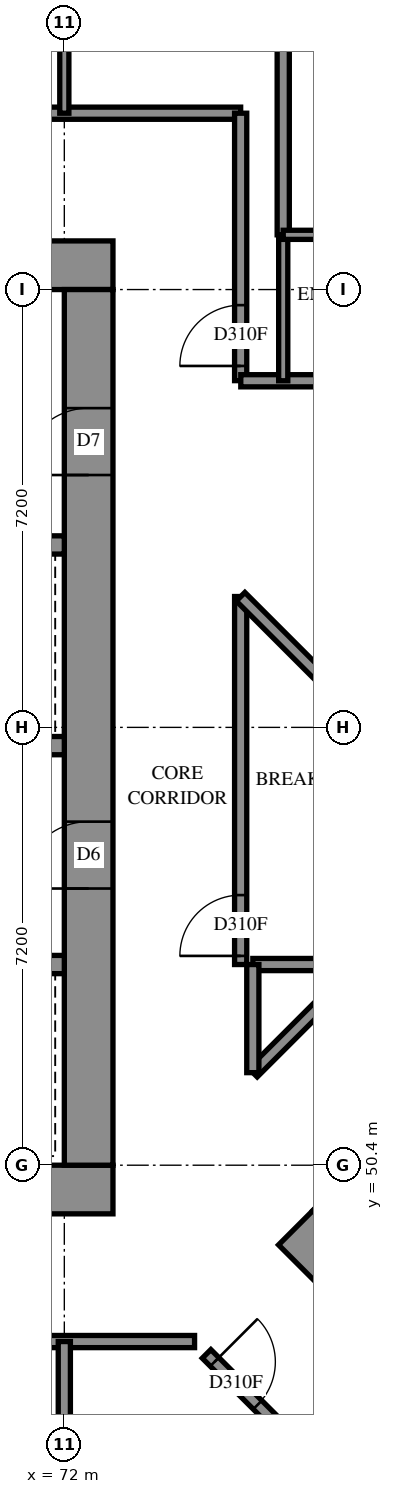
"""IFC4 building model, lengths in metres.
Left out: names, types, materials, properties, quantities, classifications, styles, units other than length and angle.
Written with IfcOpenShell. Run it as: python <this file> out.ifc"""

import sys

from ifc_helpers import new_model, si_unit, direction, frame, frame_2d, origin, place, context, subcontext, project, spatial, rectangle, extrude, element, fill, save


model = new_model("IFC4")
c1 = context("Model", 3, precision=1e-05, world=origin(), true_north=direction((0.0, 1.0)))
c2 = subcontext(c1, "Body", "Model", "MODEL_VIEW")
j1 = project(units=[si_unit("LENGTHUNIT", "METRE"), si_unit("PLANEANGLEUNIT", "RADIAN")], contexts=[c1])
p1 = place(None, origin())
s1 = spatial("IfcSite", under=j1, at=p1, CompositionType="ELEMENT")
p2 = place(p1, origin())
s2 = spatial("IfcBuilding", under=s1, at=p2, CompositionType="ELEMENT")
p3 = place(p2, frame((0.0, 0.0, 91.4)))
s3 = spatial("IfcBuildingStorey", under=s2, at=p3, CompositionType="ELEMENT", Elevation=91.4)
p4 = place(p3, frame((56.8, 50.0, -0.3), z_axis=(0.0, 0.0, 1.0), x_axis=(1.0, 0.0, 0.0)))
e1 = element("IfcWall", 1, at=p4, inside=s3, PredefinedType="SHEAR", context=c2, shape_type="SweptSolid", body=[
    extrude(rectangle(XDim=16.0, YDim=0.8, at=frame_2d((8.0, 0.0))), origin(), (0.0, 0.0, 1.0), 2.7),
])
p5 = place(p3, frame((56.8, 65.2, -0.3), z_axis=(0.0, 0.0, 1.0), x_axis=(1.0, 0.0, 0.0)))
e2 = element("IfcWall", 2, at=p5, inside=s3, PredefinedType="SHEAR", context=c2, shape_type="SweptSolid", body=[
    extrude(rectangle(XDim=16.0, YDim=0.8, at=frame_2d((8.0, 0.0))), origin(), (0.0, 0.0, 1.0), 2.7),
])
p6 = place(p5, frame((10.8, 0.0, 0.3)))
e3 = element("IfcOpeningElement", 3, at=p6, cuts=e2, PredefinedType="OPENING", context=c2, shape_type="SweptSolid", body=[
    extrude(rectangle(XDim=0.8, YDim=2.1, at=frame_2d((0.4, 1.05))), frame((0.0, 0.41, 0.0), z_axis=(0.0, -1.0, 0.0), x_axis=(1.0, 0.0, 0.0)), (0.0, 0.0, 1.0), 0.82),
])
p7 = place(p3, frame((72.4, 50.4, -0.3), z_axis=(0.0, 0.0, 1.0), x_axis=(0.0, 1.0, 0.0)))
e4 = element("IfcWall", 4, at=p7, inside=s3, PredefinedType="SHEAR", context=c2, shape_type="SweptSolid", body=[
    extrude(rectangle(XDim=14.4, YDim=0.8, at=frame_2d((7.2, 0.0))), origin(), (0.0, 0.0, 1.0), 2.7),
])
p8 = place(p7, frame((4.55, 0.0, 0.3)))
e5 = element("IfcOpeningElement", 5, at=p8, cuts=e4, PredefinedType="OPENING", context=c2, shape_type="SweptSolid", body=[
    extrude(rectangle(XDim=1.1, YDim=2.1, at=frame_2d((0.55, 1.05))), frame((0.0, 0.41, 0.0), z_axis=(0.0, -1.0, 0.0), x_axis=(1.0, 0.0, 0.0)), (0.0, 0.0, 1.0), 0.82),
])
p9 = place(p7, frame((11.35, 0.0, 0.3)))
e6 = element("IfcOpeningElement", 6, at=p9, cuts=e4, PredefinedType="OPENING", context=c2, shape_type="SweptSolid", body=[
    extrude(rectangle(XDim=1.1, YDim=2.1, at=frame_2d((0.55, 1.05))), frame((0.0, 0.41, 0.0), z_axis=(0.0, -1.0, 0.0), x_axis=(1.0, 0.0, 0.0)), (0.0, 0.0, 1.0), 0.82),
])
p10 = place(p3, frame((57.6, 53.7, 0.0), z_axis=(0.0, 0.0, 1.0), x_axis=(1.0, 0.0, 0.0)))
e7 = element("IfcWall", 7, at=p10, inside=s3, PredefinedType="SOLIDWALL", context=c2, shape_type="SweptSolid", body=[
    extrude(rectangle(XDim=14.4, YDim=0.3, at=frame_2d((7.2, 0.0))), origin(), (0.0, 0.0, 1.0), 3.1),
])
p11 = place(p10, frame((1.25, 0.0, 0.0)))
e8 = element("IfcOpeningElement", 8, at=p11, cuts=e7, PredefinedType="OPENING", context=c2, shape_type="SweptSolid", body=[
    extrude(rectangle(XDim=1.1, YDim=2.1, at=frame_2d((0.55, 1.05))), frame((0.0, 0.16, 0.0), z_axis=(0.0, -1.0, 0.0), x_axis=(1.0, 0.0, 0.0)), (0.0, 0.0, 1.0), 0.32),
])
p12 = place(p10, frame((4.85, 0.0, 0.0)))
e9 = element("IfcOpeningElement", 9, at=p12, cuts=e7, PredefinedType="OPENING", context=c2, shape_type="SweptSolid", body=[
    extrude(rectangle(XDim=1.1, YDim=2.1, at=frame_2d((0.55, 1.05))), frame((0.0, 0.16, 0.0), z_axis=(0.0, -1.0, 0.0), x_axis=(1.0, 0.0, 0.0)), (0.0, 0.0, 1.0), 0.32),
])
p13 = place(p10, frame((8.45, 0.0, 0.0)))
e10 = element("IfcOpeningElement", 10, at=p13, cuts=e7, PredefinedType="OPENING", context=c2, shape_type="SweptSolid", body=[
    extrude(rectangle(XDim=1.1, YDim=2.1, at=frame_2d((0.55, 1.05))), frame((0.0, 0.16, 0.0), z_axis=(0.0, -1.0, 0.0), x_axis=(1.0, 0.0, 0.0)), (0.0, 0.0, 1.0), 0.32),
])
p14 = place(p10, frame((12.05, 0.0, 0.0)))
e11 = element("IfcOpeningElement", 11, at=p14, cuts=e7, PredefinedType="OPENING", context=c2, shape_type="SweptSolid", body=[
    extrude(rectangle(XDim=1.1, YDim=2.1, at=frame_2d((0.55, 1.05))), frame((0.0, 0.16, 0.0), z_axis=(0.0, -1.0, 0.0), x_axis=(1.0, 0.0, 0.0)), (0.0, 0.0, 1.0), 0.32),
])
p15 = place(p3, frame((57.6, 57.3, 0.0), z_axis=(0.0, 0.0, 1.0), x_axis=(1.0, 0.0, 0.0)))
e12 = element("IfcWall", 12, at=p15, inside=s3, PredefinedType="SOLIDWALL", context=c2, shape_type="SweptSolid", body=[
    extrude(rectangle(XDim=14.4, YDim=0.3, at=frame_2d((7.2, 0.0))), origin(), (0.0, 0.0, 1.0), 3.1),
])
p16 = place(p15, frame((12.05, 0.0, 0.0)))
e13 = element("IfcOpeningElement", 13, at=p16, cuts=e12, PredefinedType="OPENING", context=c2, shape_type="SweptSolid", body=[
    extrude(rectangle(XDim=1.1, YDim=2.1, at=frame_2d((0.55, 1.05))), frame((0.0, 0.16, 0.0), z_axis=(0.0, -1.0, 0.0), x_axis=(1.0, 0.0, 0.0)), (0.0, 0.0, 1.0), 0.32),
])
p17 = place(p3, frame((64.8, 60.6, 0.0), z_axis=(0.0, 0.0, 1.0), x_axis=(1.0, 0.0, 0.0)))
e14 = element("IfcWall", 14, at=p17, inside=s3, PredefinedType="SOLIDWALL", context=c2, shape_type="SweptSolid", body=[
    extrude(rectangle(XDim=7.2, YDim=0.3, at=frame_2d((3.6, 0.0))), origin(), (0.0, 0.0, 1.0), 3.1),
])
p18 = place(p3, frame((75.806, 49.373, -0.3), z_axis=(0.0, 0.0, 1.0), x_axis=(0.7071067812, -0.7071067812, 0.0)))
e15 = element("IfcWall", 15, at=p18, inside=s3, PredefinedType="SHEAR", context=c2, shape_type="SweptSolid", body=[
    extrude(rectangle(XDim=16.0, YDim=0.8, at=frame_2d((8.0, 0.0))), origin(), (0.0, 0.0, 1.0), 2.7),
])
p19 = place(p3, frame((76.372, 49.373, -0.3), z_axis=(0.0, 0.0, 1.0), x_axis=(0.7071067812, 0.7071067812, 0.0)))
e16 = element("IfcWall", 16, at=p19, inside=s3, PredefinedType="SHEAR", context=c2, shape_type="SweptSolid", body=[
    extrude(rectangle(XDim=14.4, YDim=0.8, at=frame_2d((7.2, 0.0))), origin(), (0.0, 0.0, 1.0), 2.7),
])
p20 = place(p19, frame((4.55, 0.0, 0.3)))
e17 = element("IfcOpeningElement", 17, at=p20, cuts=e16, PredefinedType="OPENING", context=c2, shape_type="SweptSolid", body=[
    extrude(rectangle(XDim=1.1, YDim=2.1, at=frame_2d((0.55, 1.05))), frame((0.0, 0.41, 0.0), z_axis=(0.0, -1.0, 0.0), x_axis=(1.0, 0.0, 0.0)), (0.0, 0.0, 1.0), 0.82),
])
p21 = place(p19, frame((11.35, 0.0, 0.3)))
e18 = element("IfcOpeningElement", 18, at=p21, cuts=e16, PredefinedType="OPENING", context=c2, shape_type="SweptSolid", body=[
    extrude(rectangle(XDim=1.1, YDim=2.1, at=frame_2d((0.55, 1.05))), frame((0.0, 0.41, 0.0), z_axis=(0.0, -1.0, 0.0), x_axis=(1.0, 0.0, 0.0)), (0.0, 0.0, 1.0), 0.82),
])
p22 = place(p3, frame((54.7, 67.7, 0.0), z_axis=(0.0, 0.0, 1.0), x_axis=(1.0, 0.0, 0.0)))
e19 = element("IfcWall", 19, at=p22, inside=s3, PredefinedType="PARTITIONING", context=c2, shape_type="SweptSolid", body=[
    extrude(rectangle(XDim=20.2, YDim=0.2, at=frame_2d((10.1, 0.0))), origin(), (0.0, 0.0, 1.0), 3.1),
])
p23 = place(p22, frame((5.25, 0.0, 0.0)))
e20 = element("IfcOpeningElement", 20, at=p23, cuts=e19, PredefinedType="OPENING", context=c2, shape_type="SweptSolid", body=[
    extrude(rectangle(XDim=0.9, YDim=2.1, at=frame_2d((0.45, 1.05))), frame((0.0, 0.11, 0.0), z_axis=(0.0, -1.0, 0.0), x_axis=(1.0, 0.0, 0.0)), (0.0, 0.0, 1.0), 0.22),
])
p24 = place(p22, frame((6.9, 0.0, 0.0)))
e21 = element("IfcOpeningElement", 21, at=p24, cuts=e19, PredefinedType="OPENING", context=c2, shape_type="SweptSolid", body=[
    extrude(rectangle(XDim=0.9, YDim=2.1, at=frame_2d((0.45, 1.05))), frame((0.0, 0.11, 0.0), z_axis=(0.0, -1.0, 0.0), x_axis=(1.0, 0.0, 0.0)), (0.0, 0.0, 1.0), 0.22),
])
p25 = place(p22, frame((12.45, 0.0, 0.0)))
e22 = element("IfcOpeningElement", 22, at=p25, cuts=e19, PredefinedType="OPENING", context=c2, shape_type="SweptSolid", body=[
    extrude(rectangle(XDim=0.9, YDim=2.1, at=frame_2d((0.45, 1.05))), frame((0.0, 0.11, 0.0), z_axis=(0.0, -1.0, 0.0), x_axis=(1.0, 0.0, 0.0)), (0.0, 0.0, 1.0), 0.22),
])
p26 = place(p22, frame((14.1, 0.0, 0.0)))
e23 = element("IfcOpeningElement", 23, at=p26, cuts=e19, PredefinedType="OPENING", context=c2, shape_type="SweptSolid", body=[
    extrude(rectangle(XDim=0.9, YDim=2.1, at=frame_2d((0.45, 1.05))), frame((0.0, 0.11, 0.0), z_axis=(0.0, -1.0, 0.0), x_axis=(1.0, 0.0, 0.0)), (0.0, 0.0, 1.0), 0.22),
])
p27 = place(p3, frame((54.7, 47.5, 0.0), z_axis=(0.0, 0.0, 1.0), x_axis=(1.0, 0.0, 0.0)))
e24 = element("IfcWall", 24, at=p27, inside=s3, PredefinedType="PARTITIONING", context=c2, shape_type="SweptSolid", body=[
    extrude(rectangle(XDim=19.442, YDim=0.2, at=frame_2d((9.721, 0.0))), origin(), (0.0, 0.0, 1.0), 3.1),
])
p28 = place(p27, frame((5.2, 0.0, 0.0)))
e25 = element("IfcOpeningElement", 25, at=p28, cuts=e24, PredefinedType="OPENING", context=c2, shape_type="SweptSolid", body=[
    extrude(rectangle(XDim=0.9, YDim=2.1, at=frame_2d((0.45, 1.05))), frame((0.0, 0.11, 0.0), z_axis=(0.0, -1.0, 0.0), x_axis=(1.0, 0.0, 0.0)), (0.0, 0.0, 1.0), 0.22),
])
p29 = place(p27, frame((6.9, 0.0, 0.0)))
e26 = element("IfcOpeningElement", 26, at=p29, cuts=e24, PredefinedType="OPENING", context=c2, shape_type="SweptSolid", body=[
    extrude(rectangle(XDim=0.9, YDim=2.1, at=frame_2d((0.45, 1.05))), frame((0.0, 0.11, 0.0), z_axis=(0.0, -1.0, 0.0), x_axis=(1.0, 0.0, 0.0)), (0.0, 0.0, 1.0), 0.22),
])
p30 = place(p27, frame((13.963, 0.0, 0.0)))
e27 = element("IfcOpeningElement", 27, at=p30, cuts=e24, PredefinedType="OPENING", context=c2, shape_type="SweptSolid", body=[
    extrude(rectangle(XDim=1.0, YDim=2.1, at=frame_2d((0.5, 1.05))), frame((0.0, 0.11, 0.0), z_axis=(0.0, -1.0, 0.0), x_axis=(1.0, 0.0, 0.0)), (0.0, 0.0, 1.0), 0.22),
])
p31 = place(p3, frame((75.6, 65.7, 0.0), z_axis=(0.0, 0.0, 1.0), x_axis=(0.0, 1.0, 0.0)))
e28 = element("IfcWall", 28, at=p31, inside=s3, PredefinedType="PARTITIONING", context=c2, shape_type="SweptSolid", body=[
    extrude(rectangle(XDim=7.021, YDim=0.2, at=frame_2d((3.51, 0.0))), origin(), (0.0, 0.0, 1.0), 3.1),
])
p32 = place(p3, frame((74.9, 53.7, 0.0), z_axis=(0.0, 0.0, 1.0), x_axis=(0.0, 1.0, 0.0)))
e29 = element("IfcWall", 29, at=p32, inside=s3, PredefinedType="PARTITIONING", context=c2, shape_type="SweptSolid", body=[
    extrude(rectangle(XDim=6.052, YDim=0.2, at=frame_2d((3.026, 0.0))), origin(), (0.0, 0.0, 1.0), 3.1),
])
p33 = place(p32, frame((0.142, 0.0, 0.0)))
e30 = element("IfcOpeningElement", 30, at=p33, cuts=e29, PredefinedType="OPENING", context=c2, shape_type="SweptSolid", body=[
    extrude(rectangle(XDim=1.0, YDim=2.1, at=frame_2d((0.5, 1.05))), frame((0.0, 0.11, 0.0), z_axis=(0.0, -1.0, 0.0), x_axis=(1.0, 0.0, 0.0)), (0.0, 0.0, 1.0), 0.22),
])
p34 = place(p3, frame((74.9, 63.302, 0.0), z_axis=(0.0, 0.0, 1.0), x_axis=(0.0, 1.0, 0.0)))
e31 = element("IfcWall", 31, at=p34, inside=s3, PredefinedType="PARTITIONING", context=c2, shape_type="SweptSolid", body=[
    extrude(rectangle(XDim=4.398, YDim=0.2, at=frame_2d((2.199, 0.0))), origin(), (0.0, 0.0, 1.0), 3.1),
])
p35 = place(p34, frame((0.242, 0.0, 0.0)))
e32 = element("IfcOpeningElement", 32, at=p35, cuts=e31, PredefinedType="OPENING", context=c2, shape_type="SweptSolid", body=[
    extrude(rectangle(XDim=1.0, YDim=2.1, at=frame_2d((0.5, 1.05))), frame((0.0, 0.11, 0.0), z_axis=(0.0, -1.0, 0.0), x_axis=(1.0, 0.0, 0.0)), (0.0, 0.0, 1.0), 0.22),
])
p36 = place(p3, frame((74.902, 63.3, 0.0), z_axis=(0.0, 0.0, 1.0), x_axis=(1.0, 0.0, 0.0)))
e33 = element("IfcWall", 33, at=p36, inside=s3, PredefinedType="PARTITIONING", context=c2, shape_type="SweptSolid", body=[
    extrude(rectangle(XDim=4.298, YDim=0.2, at=frame_2d((2.149, 0.0))), origin(), (0.0, 0.0, 1.0), 3.1),
])
p37 = place(p36, frame((2.888, 0.0, 0.0)))
e34 = element("IfcOpeningElement", 34, at=p37, cuts=e33, PredefinedType="OPENING", context=c2, shape_type="SweptSolid", body=[
    extrude(rectangle(XDim=0.9, YDim=2.1, at=frame_2d((0.45, 1.05))), frame((0.0, 0.11, 0.0), z_axis=(0.0, -1.0, 0.0), x_axis=(1.0, 0.0, 0.0)), (0.0, 0.0, 1.0), 0.22),
])
p38 = place(p3, frame((72.0, 43.7, 0.0), z_axis=(0.0, 0.0, 1.0), x_axis=(0.0, 1.0, 0.0)))
e35 = element("IfcWall", 35, at=p38, inside=s3, PredefinedType="PARTITIONING", context=c2, shape_type="SweptSolid", body=[
    extrude(rectangle(XDim=3.8, YDim=0.2, at=frame_2d((1.9, 0.0))), origin(), (0.0, 0.0, 1.0), 3.1),
])
p39 = place(p3, frame((74.899, 59.749, 0.0), z_axis=(0.0, 0.0, 1.0), x_axis=(0.7071067812, -0.7071067812, 0.0)))
e36 = element("IfcWall", 36, at=p39, inside=s3, PredefinedType="PARTITIONING", context=c2, shape_type="SweptSolid", body=[
    extrude(rectangle(XDim=3.601, YDim=0.2, at=frame_2d((1.8, 0.0))), origin(), (0.0, 0.0, 1.0), 3.1),
])
p40 = place(p3, frame((75.102, 51.922, 0.0), z_axis=(0.0, 0.0, 1.0), x_axis=(0.7071067812, 0.7071067812, 0.0)))
e37 = element("IfcWall", 37, at=p40, inside=s3, PredefinedType="PARTITIONING", context=c2, shape_type="SweptSolid", body=[
    extrude(rectangle(XDim=2.514, YDim=0.2, at=frame_2d((1.257, 0.0))), origin(), (0.0, 0.0, 1.0), 3.1),
])
for number, where, z_axis, x_axis in (
    (38, (75.6, 63.3, 0.0), (0.0, 0.0, 1.0), (0.0, 1.0, 0.0)),
    (39, (72.0, 67.7, 0.0), (0.0, 0.0, 1.0), (0.0, 1.0, 0.0)),
):
    element("IfcWall", number, at=place(p3, frame(where, z_axis=z_axis, x_axis=x_axis)), inside=s3, PredefinedType="PARTITIONING", context=c2, shape_type="SweptSolid", body=[
        extrude(rectangle(XDim=2.4, YDim=0.15, at=frame_2d((1.2, 0.0))), origin(), (0.0, 0.0, 1.0), 3.1),
    ])
p41 = place(p3, frame((75.6, 65.7, 0.0), z_axis=(0.0, 0.0, 1.0), x_axis=(1.0, 0.0, 0.0)))
e40 = element("IfcWall", 40, at=p41, inside=s3, PredefinedType="PARTITIONING", context=c2, shape_type="SweptSolid", body=[
    extrude(rectangle(XDim=1.9, YDim=0.15, at=frame_2d((0.95, 0.0))), origin(), (0.0, 0.0, 1.0), 3.1),
])
p42 = place(p41, frame((0.607, 0.0, 0.0)))
e41 = element("IfcOpeningElement", 41, at=p42, cuts=e40, PredefinedType="OPENING", context=c2, shape_type="SweptSolid", body=[
    extrude(rectangle(XDim=0.8, YDim=2.1, at=frame_2d((0.4, 1.05))), frame((0.0, 0.085, 0.0), z_axis=(0.0, -1.0, 0.0), x_axis=(1.0, 0.0, 0.0)), (0.0, 0.0, 1.0), 0.17),
])
p43 = place(p3, frame((75.1, 53.7, 0.0), z_axis=(0.0, 0.0, 1.0), x_axis=(1.0, 0.0, 0.0)))
e42 = element("IfcWall", 42, at=p43, inside=s3, PredefinedType="PARTITIONING", context=c2, shape_type="SweptSolid", body=[
    extrude(rectangle(XDim=1.78, YDim=0.2, at=frame_2d((0.89, 0.0))), origin(), (0.0, 0.0, 1.0), 3.1),
])
p44 = place(p3, frame((74.339, 47.297, 0.0), z_axis=(0.0, 0.0, 1.0), x_axis=(0.7071067812, -0.7071067812, 0.0)))
e43 = element("IfcWall", 43, at=p44, inside=s3, PredefinedType="PARTITIONING", context=c2, shape_type="SweptSolid", body=[
    extrude(rectangle(XDim=1.779, YDim=0.2, at=frame_2d((0.889, 0.0))), origin(), (0.0, 0.0, 1.0), 3.1),
])
p45 = place(p44, frame((0.186, 0.0, 0.0)))
e44 = element("IfcOpeningElement", 44, at=p45, cuts=e43, PredefinedType="OPENING", context=c2, shape_type="SweptSolid", body=[
    extrude(rectangle(XDim=1.0, YDim=2.1, at=frame_2d((0.5, 1.05))), frame((0.0, 0.11, 0.0), z_axis=(0.0, -1.0, 0.0), x_axis=(1.0, 0.0, 0.0)), (0.0, 0.0, 1.0), 0.22),
])
p46 = place(p3, frame((75.1, 51.922, 0.0), z_axis=(0.0, 0.0, 1.0), x_axis=(0.0, 1.0, 0.0)))
e45 = element("IfcWall", 45, at=p46, inside=s3, PredefinedType="PARTITIONING", context=c2, shape_type="SweptSolid", body=[
    extrude(rectangle(XDim=1.778, YDim=0.2, at=frame_2d((0.889, 0.0))), origin(), (0.0, 0.0, 1.0), 3.1),
])
p47 = place(p8, origin())
e46 = element("IfcDoor", 46, at=p47, inside=s3, OperationType="DOUBLE_DOOR_SINGLE_SWING", PredefinedType="DOOR", context=c2, shape_type="SweptSolid", body=[
    extrude(rectangle(XDim=1.1, YDim=2.1, at=frame_2d((0.55, 1.05))), frame((0.0, 0.025, 0.0), z_axis=(0.0, -1.0, 0.0), x_axis=(1.0, 0.0, 0.0)), (0.0, 0.0, 1.0), 0.05),
])
fill(e5, e46)
p48 = place(p9, origin())
e47 = element("IfcDoor", 47, at=p48, inside=s3, OperationType="SINGLE_SWING_RIGHT", PredefinedType="DOOR", context=c2, shape_type="SweptSolid", body=[
    extrude(rectangle(XDim=1.1, YDim=2.1, at=frame_2d((0.55, 1.05))), frame((0.0, 0.025, 0.0), z_axis=(0.0, -1.0, 0.0), x_axis=(1.0, 0.0, 0.0)), (0.0, 0.0, 1.0), 0.05),
])
fill(e6, e47)
p49 = place(p33, origin())
e48 = element("IfcDoor", 48, at=p49, inside=s3, OperationType="SINGLE_SWING_LEFT", PredefinedType="DOOR", context=c2, shape_type="SweptSolid", body=[
    extrude(rectangle(XDim=1.0, YDim=2.1, at=frame_2d((0.5, 1.05))), frame((0.0, 0.025, 0.0), z_axis=(0.0, -1.0, 0.0), x_axis=(1.0, 0.0, 0.0)), (0.0, 0.0, 1.0), 0.05),
])
fill(e30, e48)
p50 = place(p35, origin())
e49 = element("IfcDoor", 49, at=p50, inside=s3, OperationType="SINGLE_SWING_RIGHT", PredefinedType="DOOR", context=c2, shape_type="SweptSolid", body=[
    extrude(rectangle(XDim=1.0, YDim=2.1, at=frame_2d((0.5, 1.05))), frame((0.0, 0.025, 0.0), z_axis=(0.0, -1.0, 0.0), x_axis=(1.0, 0.0, 0.0)), (0.0, 0.0, 1.0), 0.05),
])
fill(e32, e49)
p51 = place(p45, origin())
e50 = element("IfcDoor", 50, at=p51, inside=s3, OperationType="SINGLE_SWING_LEFT", PredefinedType="DOOR", context=c2, shape_type="SweptSolid", body=[
    extrude(rectangle(XDim=1.0, YDim=2.1, at=frame_2d((0.5, 1.05))), frame((0.0, 0.025, 0.0), z_axis=(0.0, -1.0, 0.0), x_axis=(1.0, 0.0, 0.0)), (0.0, 0.0, 1.0), 0.05),
])
fill(e44, e50)
save(model, sys.argv[1])
